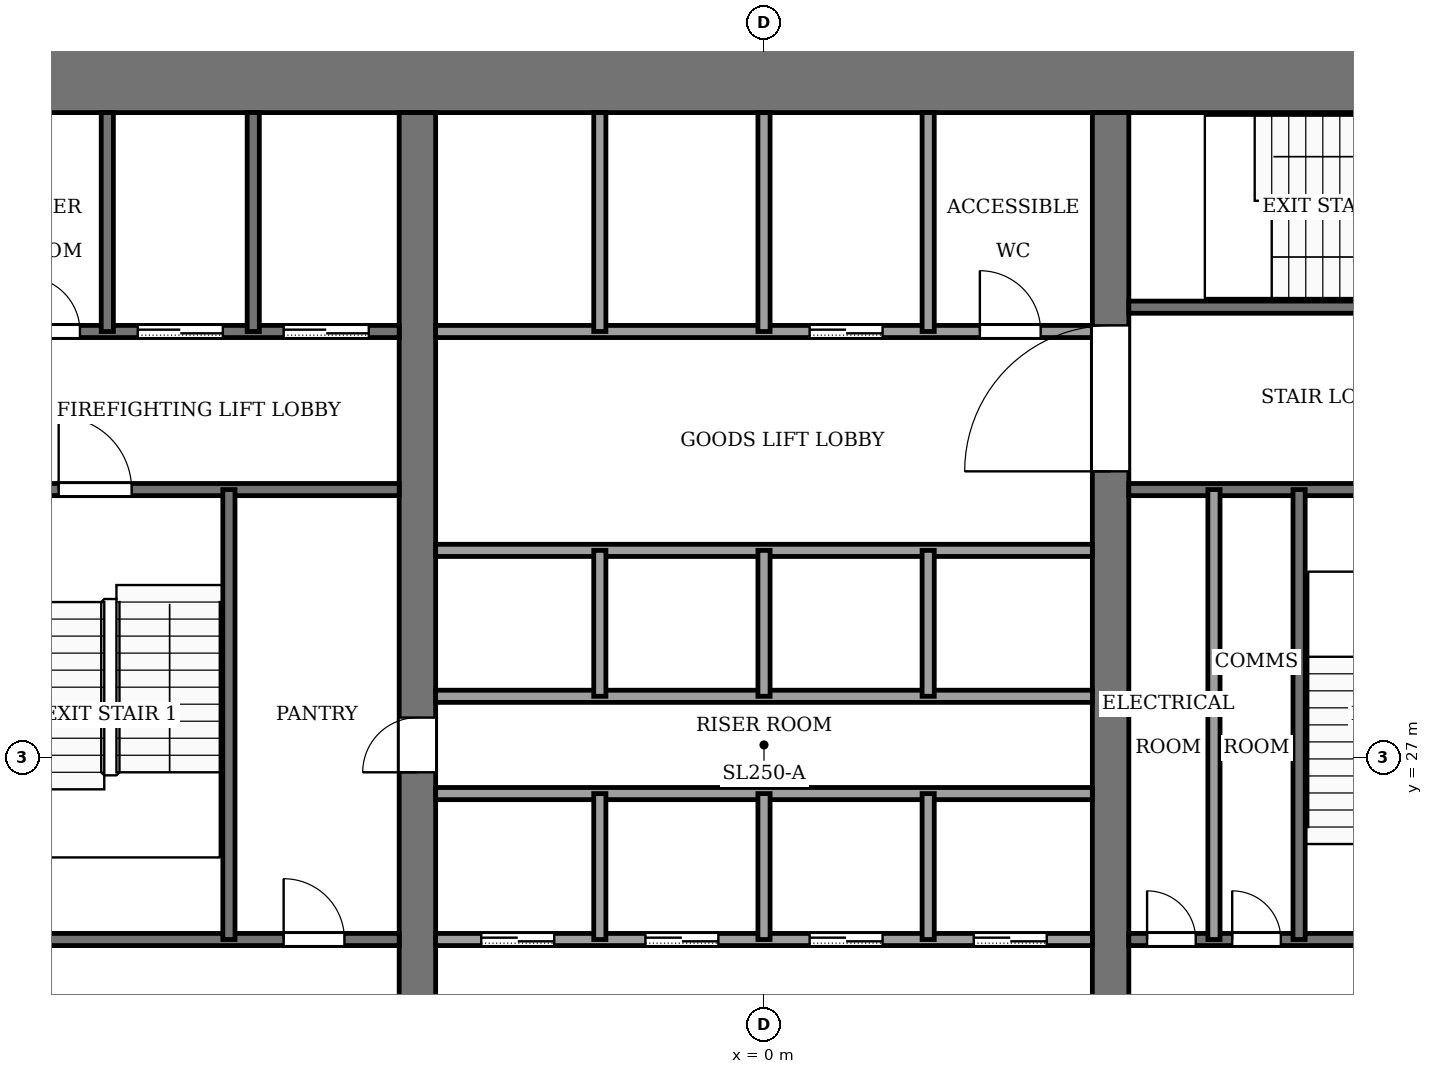
"""IFC4 building model, lengths in metres.
Left out: names, types, materials, properties, quantities, classifications, styles, units other than length and angle.
Written with IfcOpenShell. Run it as: python <this file> out.ifc"""

import sys

from ifc_helpers import new_model, si_unit, direction, frame, frame_2d, origin, place, context, subcontext, project, spatial, rectangle, extrude, element, fill, save


model = new_model("IFC4")
c1 = context("Model", 3, precision=1e-05, world=origin(), true_north=direction((0.0, 1.0)))
c2 = subcontext(c1, "Body", "Model", "MODEL_VIEW")
j1 = project(units=[si_unit("LENGTHUNIT", "METRE"), si_unit("PLANEANGLEUNIT", "RADIAN")], contexts=[c1])
p1 = place(None, origin())
s1 = spatial("IfcSite", under=j1, at=p1, CompositionType="ELEMENT")
p2 = place(p1, origin())
s2 = spatial("IfcBuilding", under=s1, at=p2, CompositionType="ELEMENT")
p3 = place(p2, frame((0.0, 0.0, 70.0)))
s3 = spatial("IfcBuildingStorey", under=s2, at=p3, CompositionType="ELEMENT", Elevation=70.0)
p4 = place(p3, frame((-13.8, 38.2, -0.13), z_axis=(0.0, 0.0, 1.0), x_axis=(1.0, 0.0, 0.0)))
e1 = element("IfcWall", 1, at=p4, inside=s3, PredefinedType="SHEAR", context=c2, shape_type="SweptSolid", body=[
    extrude(rectangle(XDim=27.6, YDim=1.2, at=frame_2d((13.8, 0.0))), origin(), (0.0, 0.0, 1.0), 4.0),
])
p5 = place(p3, frame((-5.7, 18.4, -0.13), z_axis=(0.0, 0.0, 1.0), x_axis=(0.0, 1.0, 0.0)))
e2 = element("IfcWall", 2, at=p5, inside=s3, PredefinedType="SHEAR", context=c2, shape_type="SweptSolid", body=[
    extrude(rectangle(XDim=19.2, YDim=0.6, at=frame_2d((9.6, 0.0))), origin(), (0.0, 0.0, 1.0), 4.0),
])
p6 = place(p5, frame((8.35, 0.0, 0.13)))
e3 = element("IfcOpeningElement", 3, at=p6, cuts=e2, PredefinedType="OPENING", context=c2, shape_type="SweptSolid", body=[
    extrude(rectangle(XDim=0.9, YDim=2.1, at=frame_2d((0.45, 1.05))), frame((0.0, 0.31, 0.0), z_axis=(0.0, -1.0, 0.0), x_axis=(1.0, 0.0, 0.0)), (0.0, 0.0, 1.0), 0.62),
])
p7 = place(p3, frame((5.7, 18.4, -0.13), z_axis=(0.0, 0.0, 1.0), x_axis=(0.0, 1.0, 0.0)))
e4 = element("IfcWall", 4, at=p7, inside=s3, PredefinedType="SHEAR", context=c2, shape_type="SweptSolid", body=[
    extrude(rectangle(XDim=19.2, YDim=0.6, at=frame_2d((9.6, 0.0))), origin(), (0.0, 0.0, 1.0), 4.0),
])
p8 = place(p7, frame((13.3, 0.0, 0.13)))
e5 = element("IfcOpeningElement", 5, at=p8, cuts=e4, PredefinedType="OPENING", context=c2, shape_type="SweptSolid", body=[
    extrude(rectangle(XDim=2.4, YDim=2.4, at=frame_2d((1.2, 1.2))), frame((0.0, 0.31, 0.0), z_axis=(0.0, -1.0, 0.0), x_axis=(1.0, 0.0, 0.0)), (0.0, 0.0, 1.0), 0.62),
])
p9 = place(p3, frame((-12.6, 24.0, 0.0), z_axis=(0.0, 0.0, 1.0), x_axis=(1.0, 0.0, 0.0)))
e6 = element("IfcWall", 6, at=p9, inside=s3, PredefinedType="PARTITIONING", context=c2, shape_type="SweptSolid", body=[
    extrude(rectangle(XDim=6.6, YDim=0.2, at=frame_2d((3.3, 0.0))), origin(), (0.0, 0.0, 1.0), 3.87),
])
p10 = place(p9, frame((4.7, 0.0, 0.0)))
e7 = element("IfcOpeningElement", 7, at=p10, cuts=e6, PredefinedType="OPENING", context=c2, shape_type="SweptSolid", body=[
    extrude(rectangle(XDim=1.0, YDim=2.1, at=frame_2d((0.5, 1.05))), frame((0.0, 0.11, 0.0), z_axis=(0.0, -1.0, 0.0), x_axis=(1.0, 0.0, 0.0)), (0.0, 0.0, 1.0), 0.22),
])
p11 = place(p3, frame((-5.4, 24.0, 0.0), z_axis=(0.0, 0.0, 1.0), x_axis=(1.0, 0.0, 0.0)))
e8 = element("IfcWall", 8, at=p11, inside=s3, PredefinedType="PARTITIONING", context=c2, shape_type="SweptSolid", body=[
    extrude(rectangle(XDim=10.8, YDim=0.2, at=frame_2d((5.4, 0.0))), origin(), (0.0, 0.0, 1.0), 3.87),
])
p12 = place(p11, frame((0.75, 0.0, 0.0)))
e9 = element("IfcOpeningElement", 9, at=p12, cuts=e8, PredefinedType="OPENING", context=c2, shape_type="SweptSolid", body=[
    extrude(rectangle(XDim=1.2, YDim=2.2, at=frame_2d((0.6, 1.1))), frame((0.0, 0.11, 0.0), z_axis=(0.0, -1.0, 0.0), x_axis=(1.0, 0.0, 0.0)), (0.0, 0.0, 1.0), 0.22),
])
p13 = place(p11, frame((3.45, 0.0, 0.0)))
e10 = element("IfcOpeningElement", 10, at=p13, cuts=e8, PredefinedType="OPENING", context=c2, shape_type="SweptSolid", body=[
    extrude(rectangle(XDim=1.2, YDim=2.2, at=frame_2d((0.6, 1.1))), frame((0.0, 0.11, 0.0), z_axis=(0.0, -1.0, 0.0), x_axis=(1.0, 0.0, 0.0)), (0.0, 0.0, 1.0), 0.22),
])
p14 = place(p11, frame((6.15, 0.0, 0.0)))
e11 = element("IfcOpeningElement", 11, at=p14, cuts=e8, PredefinedType="OPENING", context=c2, shape_type="SweptSolid", body=[
    extrude(rectangle(XDim=1.2, YDim=2.2, at=frame_2d((0.6, 1.1))), frame((0.0, 0.11, 0.0), z_axis=(0.0, -1.0, 0.0), x_axis=(1.0, 0.0, 0.0)), (0.0, 0.0, 1.0), 0.22),
])
p15 = place(p11, frame((8.85, 0.0, 0.0)))
e12 = element("IfcOpeningElement", 12, at=p15, cuts=e8, PredefinedType="OPENING", context=c2, shape_type="SweptSolid", body=[
    extrude(rectangle(XDim=1.2, YDim=2.2, at=frame_2d((0.6, 1.1))), frame((0.0, 0.11, 0.0), z_axis=(0.0, -1.0, 0.0), x_axis=(1.0, 0.0, 0.0)), (0.0, 0.0, 1.0), 0.22),
])
p16 = place(p3, frame((6.0, 24.0, 0.0), z_axis=(0.0, 0.0, 1.0), x_axis=(1.0, 0.0, 0.0)))
e13 = element("IfcWall", 13, at=p16, inside=s3, PredefinedType="PARTITIONING", context=c2, shape_type="SweptSolid", body=[
    extrude(rectangle(XDim=6.6, YDim=0.2, at=frame_2d((3.3, 0.0))), origin(), (0.0, 0.0, 1.0), 3.87),
])
p17 = place(p16, frame((0.3, 0.0, 0.0)))
e14 = element("IfcOpeningElement", 14, at=p17, cuts=e13, PredefinedType="OPENING", context=c2, shape_type="SweptSolid", body=[
    extrude(rectangle(XDim=0.8, YDim=2.1, at=frame_2d((0.4, 1.05))), frame((0.0, 0.11, 0.0), z_axis=(0.0, -1.0, 0.0), x_axis=(1.0, 0.0, 0.0)), (0.0, 0.0, 1.0), 0.22),
])
p18 = place(p16, frame((1.7, 0.0, 0.0)))
e15 = element("IfcOpeningElement", 15, at=p18, cuts=e13, PredefinedType="OPENING", context=c2, shape_type="SweptSolid", body=[
    extrude(rectangle(XDim=0.8, YDim=2.1, at=frame_2d((0.4, 1.05))), frame((0.0, 0.11, 0.0), z_axis=(0.0, -1.0, 0.0), x_axis=(1.0, 0.0, 0.0)), (0.0, 0.0, 1.0), 0.22),
])
p19 = place(p16, frame((4.4, 0.0, 0.0)))
e16 = element("IfcOpeningElement", 16, at=p19, cuts=e13, PredefinedType="OPENING", context=c2, shape_type="SweptSolid", body=[
    extrude(rectangle(XDim=1.2, YDim=2.2, at=frame_2d((0.6, 1.1))), frame((0.0, 0.11, 0.0), z_axis=(0.0, -1.0, 0.0), x_axis=(1.0, 0.0, 0.0)), (0.0, 0.0, 1.0), 0.22),
])
for number, where, z_axis, x_axis in (
    (17, (-5.4, 26.4, 0.0), (0.0, 0.0, 1.0), (1.0, 0.0, 0.0)),
    (18, (-5.4, 28.0, 0.0), (0.0, 0.0, 1.0), (1.0, 0.0, 0.0)),
    (19, (-5.4, 30.4, 0.0), (0.0, 0.0, 1.0), (1.0, 0.0, 0.0)),
):
    element("IfcWall", number, at=place(p3, frame(where, z_axis=z_axis, x_axis=x_axis)), inside=s3, PredefinedType="PARTITIONING", context=c2, shape_type="SweptSolid", body=[
        extrude(rectangle(XDim=10.8, YDim=0.2, at=frame_2d((5.4, 0.0))), origin(), (0.0, 0.0, 1.0), 3.87),
    ])
p20 = place(p3, frame((-12.6, 31.4, 0.0), z_axis=(0.0, 0.0, 1.0), x_axis=(1.0, 0.0, 0.0)))
e20 = element("IfcWall", 20, at=p20, inside=s3, PredefinedType="PARTITIONING", context=c2, shape_type="SweptSolid", body=[
    extrude(rectangle(XDim=6.6, YDim=0.2, at=frame_2d((3.3, 0.0))), origin(), (0.0, 0.0, 1.0), 3.87),
])
p21 = place(p20, frame((1.0, 0.0, 0.0)))
e21 = element("IfcOpeningElement", 21, at=p21, cuts=e20, PredefinedType="OPENING", context=c2, shape_type="SweptSolid", body=[
    extrude(rectangle(XDim=1.2, YDim=2.2, at=frame_2d((0.6, 1.1))), frame((0.0, 0.11, 0.0), z_axis=(0.0, -1.0, 0.0), x_axis=(1.0, 0.0, 0.0)), (0.0, 0.0, 1.0), 0.22),
])
p22 = place(p3, frame((6.0, 31.4, 0.0), z_axis=(0.0, 0.0, 1.0), x_axis=(1.0, 0.0, 0.0)))
e22 = element("IfcWall", 22, at=p22, inside=s3, PredefinedType="PARTITIONING", context=c2, shape_type="SweptSolid", body=[
    extrude(rectangle(XDim=6.6, YDim=0.2, at=frame_2d((3.3, 0.0))), origin(), (0.0, 0.0, 1.0), 3.87),
])
p23 = place(p3, frame((-12.6, 34.0, 0.0), z_axis=(0.0, 0.0, 1.0), x_axis=(1.0, 0.0, 0.0)))
e23 = element("IfcWall", 23, at=p23, inside=s3, PredefinedType="PARTITIONING", context=c2, shape_type="SweptSolid", body=[
    extrude(rectangle(XDim=6.6, YDim=0.2, at=frame_2d((3.3, 0.0))), origin(), (0.0, 0.0, 1.0), 3.87),
])
p24 = place(p23, frame((4.7, 0.0, 0.0)))
e24 = element("IfcOpeningElement", 24, at=p24, cuts=e23, PredefinedType="OPENING", context=c2, shape_type="SweptSolid", body=[
    extrude(rectangle(XDim=1.4, YDim=2.2, at=frame_2d((0.7, 1.1))), frame((0.0, 0.11, 0.0), z_axis=(0.0, -1.0, 0.0), x_axis=(1.0, 0.0, 0.0)), (0.0, 0.0, 1.0), 0.22),
])
p25 = place(p23, frame((2.3, 0.0, 0.0)))
e25 = element("IfcOpeningElement", 25, at=p25, cuts=e23, PredefinedType="OPENING", context=c2, shape_type="SweptSolid", body=[
    extrude(rectangle(XDim=1.4, YDim=2.2, at=frame_2d((0.7, 1.1))), frame((0.0, 0.11, 0.0), z_axis=(0.0, -1.0, 0.0), x_axis=(1.0, 0.0, 0.0)), (0.0, 0.0, 1.0), 0.22),
])
p26 = place(p23, frame((0.45, 0.0, 0.0)))
e26 = element("IfcOpeningElement", 26, at=p26, cuts=e23, PredefinedType="OPENING", context=c2, shape_type="SweptSolid", body=[
    extrude(rectangle(XDim=0.9, YDim=2.1, at=frame_2d((0.45, 1.05))), frame((0.0, 0.11, 0.0), z_axis=(0.0, -1.0, 0.0), x_axis=(1.0, 0.0, 0.0)), (0.0, 0.0, 1.0), 0.22),
])
p27 = place(p3, frame((-5.4, 34.0, 0.0), z_axis=(0.0, 0.0, 1.0), x_axis=(1.0, 0.0, 0.0)))
e27 = element("IfcWall", 27, at=p27, inside=s3, PredefinedType="PARTITIONING", context=c2, shape_type="SweptSolid", body=[
    extrude(rectangle(XDim=10.8, YDim=0.2, at=frame_2d((5.4, 0.0))), origin(), (0.0, 0.0, 1.0), 3.87),
])
p28 = place(p27, frame((6.15, 0.0, 0.0)))
e28 = element("IfcOpeningElement", 28, at=p28, cuts=e27, PredefinedType="OPENING", context=c2, shape_type="SweptSolid", body=[
    extrude(rectangle(XDim=1.2, YDim=2.2, at=frame_2d((0.6, 1.1))), frame((0.0, 0.11, 0.0), z_axis=(0.0, -1.0, 0.0), x_axis=(1.0, 0.0, 0.0)), (0.0, 0.0, 1.0), 0.22),
])
p29 = place(p27, frame((8.95, 0.0, 0.0)))
e29 = element("IfcOpeningElement", 29, at=p29, cuts=e27, PredefinedType="OPENING", context=c2, shape_type="SweptSolid", body=[
    extrude(rectangle(XDim=1.0, YDim=2.1, at=frame_2d((0.5, 1.05))), frame((0.0, 0.11, 0.0), z_axis=(0.0, -1.0, 0.0), x_axis=(1.0, 0.0, 0.0)), (0.0, 0.0, 1.0), 0.22),
])
p30 = place(p3, frame((6.0, 34.4, 0.0), z_axis=(0.0, 0.0, 1.0), x_axis=(1.0, 0.0, 0.0)))
e30 = element("IfcWall", 30, at=p30, inside=s3, PredefinedType="PARTITIONING", context=c2, shape_type="SweptSolid", body=[
    extrude(rectangle(XDim=6.6, YDim=0.2, at=frame_2d((3.3, 0.0))), origin(), (0.0, 0.0, 1.0), 3.87),
])
p31 = place(p30, frame((4.8, 0.0, 0.0)))
e31 = element("IfcOpeningElement", 31, at=p31, cuts=e30, PredefinedType="OPENING", context=c2, shape_type="SweptSolid", body=[
    extrude(rectangle(XDim=1.2, YDim=2.2, at=frame_2d((0.6, 1.1))), frame((0.0, 0.11, 0.0), z_axis=(0.0, -1.0, 0.0), x_axis=(1.0, 0.0, 0.0)), (0.0, 0.0, 1.0), 0.22),
])
p32 = place(p3, frame((-10.8, 34.0, 0.0), z_axis=(0.0, 0.0, 1.0), x_axis=(0.0, 1.0, 0.0)))
e32 = element("IfcWall", 32, at=p32, inside=s3, PredefinedType="PARTITIONING", context=c2, shape_type="SweptSolid", body=[
    extrude(rectangle(XDim=3.6, YDim=0.2, at=frame_2d((1.8, 0.0))), origin(), (0.0, 0.0, 1.0), 3.87),
])
p33 = place(p3, frame((-8.8, 24.0, 0.0), z_axis=(0.0, 0.0, 1.0), x_axis=(0.0, 1.0, 0.0)))
e33 = element("IfcWall", 33, at=p33, inside=s3, PredefinedType="PARTITIONING", context=c2, shape_type="SweptSolid", body=[
    extrude(rectangle(XDim=7.4, YDim=0.2, at=frame_2d((3.7, 0.0))), origin(), (0.0, 0.0, 1.0), 3.87),
])
p34 = place(p3, frame((-8.4, 34.0, 0.0), z_axis=(0.0, 0.0, 1.0), x_axis=(0.0, 1.0, 0.0)))
e34 = element("IfcWall", 34, at=p34, inside=s3, PredefinedType="PARTITIONING", context=c2, shape_type="SweptSolid", body=[
    extrude(rectangle(XDim=3.6, YDim=0.2, at=frame_2d((1.8, 0.0))), origin(), (0.0, 0.0, 1.0), 3.87),
])
for number, where, z_axis, x_axis in (
    (35, (-2.7, 24.0, 0.0), (0.0, 0.0, 1.0), (0.0, 1.0, 0.0)),
    (36, (-2.7, 28.0, 0.0), (0.0, 0.0, 1.0), (0.0, 1.0, 0.0)),
):
    element("IfcWall", number, at=place(p3, frame(where, z_axis=z_axis, x_axis=x_axis)), inside=s3, PredefinedType="PARTITIONING", context=c2, shape_type="SweptSolid", body=[
        extrude(rectangle(XDim=2.4, YDim=0.2, at=frame_2d((1.2, 0.0))), origin(), (0.0, 0.0, 1.0), 3.87),
    ])
p35 = place(p3, frame((-2.7, 34.0, 0.0), z_axis=(0.0, 0.0, 1.0), x_axis=(0.0, 1.0, 0.0)))
e37 = element("IfcWall", 37, at=p35, inside=s3, PredefinedType="PARTITIONING", context=c2, shape_type="SweptSolid", body=[
    extrude(rectangle(XDim=3.6, YDim=0.2, at=frame_2d((1.8, 0.0))), origin(), (0.0, 0.0, 1.0), 3.87),
])
for number, where, z_axis, x_axis in (
    (38, (0.0, 24.0, 0.0), (0.0, 0.0, 1.0), (0.0, 1.0, 0.0)),
    (39, (0.0, 28.0, 0.0), (0.0, 0.0, 1.0), (0.0, 1.0, 0.0)),
):
    element("IfcWall", number, at=place(p3, frame(where, z_axis=z_axis, x_axis=x_axis)), inside=s3, PredefinedType="PARTITIONING", context=c2, shape_type="SweptSolid", body=[
        extrude(rectangle(XDim=2.4, YDim=0.2, at=frame_2d((1.2, 0.0))), origin(), (0.0, 0.0, 1.0), 3.87),
    ])
p36 = place(p3, frame((0.0, 34.0, 0.0), z_axis=(0.0, 0.0, 1.0), x_axis=(0.0, 1.0, 0.0)))
e40 = element("IfcWall", 40, at=p36, inside=s3, PredefinedType="PARTITIONING", context=c2, shape_type="SweptSolid", body=[
    extrude(rectangle(XDim=3.6, YDim=0.2, at=frame_2d((1.8, 0.0))), origin(), (0.0, 0.0, 1.0), 3.87),
])
for number, where, z_axis, x_axis in (
    (41, (2.7, 24.0, 0.0), (0.0, 0.0, 1.0), (0.0, 1.0, 0.0)),
    (42, (2.7, 28.0, 0.0), (0.0, 0.0, 1.0), (0.0, 1.0, 0.0)),
):
    element("IfcWall", number, at=place(p3, frame(where, z_axis=z_axis, x_axis=x_axis)), inside=s3, PredefinedType="PARTITIONING", context=c2, shape_type="SweptSolid", body=[
        extrude(rectangle(XDim=2.4, YDim=0.2, at=frame_2d((1.2, 0.0))), origin(), (0.0, 0.0, 1.0), 3.87),
    ])
p37 = place(p3, frame((2.7, 34.0, 0.0), z_axis=(0.0, 0.0, 1.0), x_axis=(0.0, 1.0, 0.0)))
e43 = element("IfcWall", 43, at=p37, inside=s3, PredefinedType="PARTITIONING", context=c2, shape_type="SweptSolid", body=[
    extrude(rectangle(XDim=3.6, YDim=0.2, at=frame_2d((1.8, 0.0))), origin(), (0.0, 0.0, 1.0), 3.87),
])
for number, where, z_axis, x_axis in (
    (44, (7.4, 24.0, 0.0), (0.0, 0.0, 1.0), (0.0, 1.0, 0.0)),
    (45, (8.8, 24.0, 0.0), (0.0, 0.0, 1.0), (0.0, 1.0, 0.0)),
):
    element("IfcWall", number, at=place(p3, frame(where, z_axis=z_axis, x_axis=x_axis)), inside=s3, PredefinedType="PARTITIONING", context=c2, shape_type="SweptSolid", body=[
        extrude(rectangle(XDim=7.4, YDim=0.2, at=frame_2d((3.7, 0.0))), origin(), (0.0, 0.0, 1.0), 3.87),
    ])
p38 = place(p12, origin())
e46 = element("IfcDoor", 46, at=p38, inside=s3, OperationType="SLIDING_TO_LEFT", PredefinedType="DOOR", context=c2, shape_type="SweptSolid", body=[
    extrude(rectangle(XDim=1.2, YDim=2.2, at=frame_2d((0.6, 1.1))), frame((0.0, 0.025, 0.0), z_axis=(0.0, -1.0, 0.0), x_axis=(1.0, 0.0, 0.0)), (0.0, 0.0, 1.0), 0.05),
])
fill(e9, e46)
p39 = place(p13, origin())
e47 = element("IfcDoor", 47, at=p39, inside=s3, OperationType="SLIDING_TO_LEFT", PredefinedType="DOOR", context=c2, shape_type="SweptSolid", body=[
    extrude(rectangle(XDim=1.2, YDim=2.2, at=frame_2d((0.6, 1.1))), frame((0.0, 0.025, 0.0), z_axis=(0.0, -1.0, 0.0), x_axis=(1.0, 0.0, 0.0)), (0.0, 0.0, 1.0), 0.05),
])
fill(e10, e47)
p40 = place(p14, origin())
e48 = element("IfcDoor", 48, at=p40, inside=s3, OperationType="SLIDING_TO_LEFT", PredefinedType="DOOR", context=c2, shape_type="SweptSolid", body=[
    extrude(rectangle(XDim=1.2, YDim=2.2, at=frame_2d((0.6, 1.1))), frame((0.0, 0.025, 0.0), z_axis=(0.0, -1.0, 0.0), x_axis=(1.0, 0.0, 0.0)), (0.0, 0.0, 1.0), 0.05),
])
fill(e11, e48)
p41 = place(p15, origin())
e49 = element("IfcDoor", 49, at=p41, inside=s3, OperationType="SLIDING_TO_LEFT", PredefinedType="DOOR", context=c2, shape_type="SweptSolid", body=[
    extrude(rectangle(XDim=1.2, YDim=2.2, at=frame_2d((0.6, 1.1))), frame((0.0, 0.025, 0.0), z_axis=(0.0, -1.0, 0.0), x_axis=(1.0, 0.0, 0.0)), (0.0, 0.0, 1.0), 0.05),
])
fill(e12, e49)
p42 = place(p28, origin())
e50 = element("IfcDoor", 50, at=p42, inside=s3, OperationType="SLIDING_TO_LEFT", PredefinedType="DOOR", context=c2, shape_type="SweptSolid", body=[
    extrude(rectangle(XDim=1.2, YDim=2.2, at=frame_2d((0.6, 1.1))), frame((0.0, 0.025, 0.0), z_axis=(0.0, -1.0, 0.0), x_axis=(1.0, 0.0, 0.0)), (0.0, 0.0, 1.0), 0.05),
])
fill(e28, e50)
p43 = place(p24, origin())
e51 = element("IfcDoor", 51, at=p43, inside=s3, OperationType="SLIDING_TO_LEFT", PredefinedType="DOOR", context=c2, shape_type="SweptSolid", body=[
    extrude(rectangle(XDim=1.4, YDim=2.2, at=frame_2d((0.7, 1.1))), frame((0.0, 0.025, 0.0), z_axis=(0.0, -1.0, 0.0), x_axis=(1.0, 0.0, 0.0)), (0.0, 0.0, 1.0), 0.05),
])
fill(e24, e51)
p44 = place(p25, origin())
e52 = element("IfcDoor", 52, at=p44, inside=s3, OperationType="SLIDING_TO_LEFT", PredefinedType="DOOR", context=c2, shape_type="SweptSolid", body=[
    extrude(rectangle(XDim=1.4, YDim=2.2, at=frame_2d((0.7, 1.1))), frame((0.0, 0.025, 0.0), z_axis=(0.0, -1.0, 0.0), x_axis=(1.0, 0.0, 0.0)), (0.0, 0.0, 1.0), 0.05),
])
fill(e25, e52)
p45 = place(p26, origin())
e53 = element("IfcDoor", 53, at=p45, inside=s3, OperationType="SINGLE_SWING_RIGHT", PredefinedType="DOOR", context=c2, shape_type="SweptSolid", body=[
    extrude(rectangle(XDim=0.9, YDim=2.1, at=frame_2d((0.45, 1.05))), frame((0.0, 0.025, 0.0), z_axis=(0.0, -1.0, 0.0), x_axis=(1.0, 0.0, 0.0)), (0.0, 0.0, 1.0), 0.05),
])
fill(e26, e53)
p46 = place(p10, origin())
e54 = element("IfcDoor", 54, at=p46, inside=s3, OperationType="SINGLE_SWING_RIGHT", PredefinedType="DOOR", context=c2, shape_type="SweptSolid", body=[
    extrude(rectangle(XDim=1.0, YDim=2.1, at=frame_2d((0.5, 1.05))), frame((0.0, 0.025, 0.0), z_axis=(0.0, -1.0, 0.0), x_axis=(1.0, 0.0, 0.0)), (0.0, 0.0, 1.0), 0.05),
])
fill(e7, e54)
p47 = place(p17, origin())
e55 = element("IfcDoor", 55, at=p47, inside=s3, OperationType="SINGLE_SWING_RIGHT", PredefinedType="DOOR", context=c2, shape_type="SweptSolid", body=[
    extrude(rectangle(XDim=0.8, YDim=2.1, at=frame_2d((0.4, 1.05))), frame((0.0, 0.025, 0.0), z_axis=(0.0, -1.0, 0.0), x_axis=(1.0, 0.0, 0.0)), (0.0, 0.0, 1.0), 0.05),
])
fill(e14, e55)
p48 = place(p18, origin())
e56 = element("IfcDoor", 56, at=p48, inside=s3, OperationType="SINGLE_SWING_LEFT", PredefinedType="DOOR", context=c2, shape_type="SweptSolid", body=[
    extrude(rectangle(XDim=0.8, YDim=2.1, at=frame_2d((0.4, 1.05))), frame((0.0, 0.025, 0.0), z_axis=(0.0, -1.0, 0.0), x_axis=(1.0, 0.0, 0.0)), (0.0, 0.0, 1.0), 0.05),
])
fill(e15, e56)
p49 = place(p29, origin())
e57 = element("IfcDoor", 57, at=p49, inside=s3, OperationType="SINGLE_SWING_LEFT", PredefinedType="DOOR", context=c2, shape_type="SweptSolid", body=[
    extrude(rectangle(XDim=1.0, YDim=2.1, at=frame_2d((0.5, 1.05))), frame((0.0, 0.025, 0.0), z_axis=(0.0, -1.0, 0.0), x_axis=(1.0, 0.0, 0.0)), (0.0, 0.0, 1.0), 0.05),
])
fill(e29, e57)
p50 = place(p6, origin())
e58 = element("IfcDoor", 58, at=p50, inside=s3, OperationType="SINGLE_SWING_LEFT", PredefinedType="DOOR", context=c2, shape_type="SweptSolid", body=[
    extrude(rectangle(XDim=0.9, YDim=2.1, at=frame_2d((0.45, 1.05))), frame((0.0, 0.025, 0.0), z_axis=(0.0, -1.0, 0.0), x_axis=(1.0, 0.0, 0.0)), (0.0, 0.0, 1.0), 0.05),
])
fill(e3, e58)
p51 = place(p21, origin())
e59 = element("IfcDoor", 59, at=p51, inside=s3, OperationType="SINGLE_SWING_LEFT", PredefinedType="DOOR", context=c2, shape_type="SweptSolid", body=[
    extrude(rectangle(XDim=1.2, YDim=2.2, at=frame_2d((0.6, 1.1))), frame((0.0, 0.025, 0.0), z_axis=(0.0, -1.0, 0.0), x_axis=(1.0, 0.0, 0.0)), (0.0, 0.0, 1.0), 0.05),
])
fill(e21, e59)
p52 = place(p8, origin())
e60 = element("IfcDoor", 60, at=p52, inside=s3, OperationType="DOUBLE_DOOR_SINGLE_SWING", PredefinedType="DOOR", context=c2, shape_type="SweptSolid", body=[
    extrude(rectangle(XDim=2.4, YDim=2.4, at=frame_2d((1.2, 1.2))), frame((0.0, 0.025, 0.0), z_axis=(0.0, -1.0, 0.0), x_axis=(1.0, 0.0, 0.0)), (0.0, 0.0, 1.0), 0.05),
])
fill(e5, e60)
save(model, sys.argv[1])
